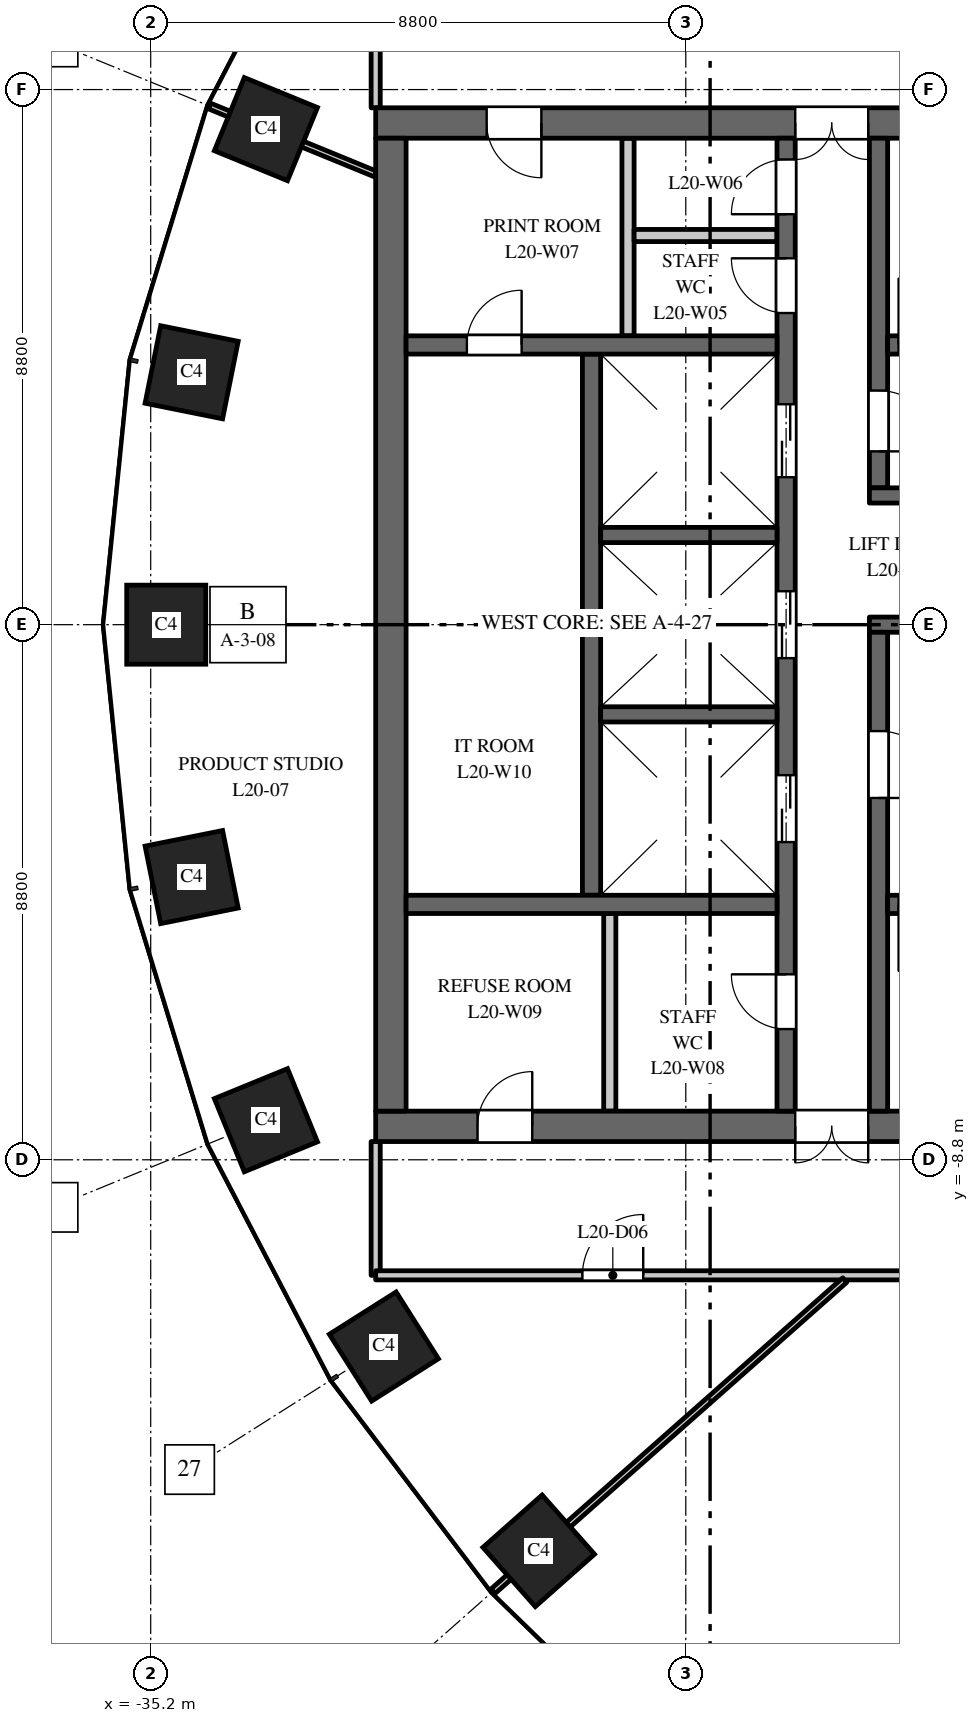
"""IFC4 building model, lengths in metres.
Left out: names, types, materials, properties, quantities, classifications, styles, units other than length and angle.
Written with IfcOpenShell. Run it as: python <this file> out.ifc"""

import sys

from ifc_helpers import new_model, si_unit, direction, frame, frame_2d, origin, origin_2d, place, context, subcontext, project, spatial, rectangle, extrude, element, fill, save


model = new_model("IFC4")
c1 = context("Model", 3, precision=1e-05, world=origin(), true_north=direction((0.0, 1.0)))
c2 = subcontext(c1, "Body", "Model", "MODEL_VIEW")
j1 = project(units=[si_unit("LENGTHUNIT", "METRE"), si_unit("PLANEANGLEUNIT", "RADIAN")], contexts=[c1])
p1 = place(None, origin())
s1 = spatial("IfcSite", under=j1, at=p1, CompositionType="ELEMENT")
p2 = place(p1, origin())
s2 = spatial("IfcBuilding", under=s1, at=p2, CompositionType="ELEMENT")
p3 = place(p2, frame((0.0, 0.0, 92.0)))
s3 = spatial("IfcBuildingStorey", under=s2, at=p3, CompositionType="ELEMENT", Elevation=92.0)
for number, where, z_axis, x_axis in (
    (1, (-33.305, 8.149, 0.0), (0.0, 0.0, 1.0), (-0.379, -0.925, 0.0)),
    (2, (-34.527, 4.151, 0.0), (0.0, 0.0, 1.0), (-0.197, -0.98, 0.0)),
    (3, (-34.945, 0.0, 0.0), (0.0, 0.0, 1.0), (0.0, -1.0, 0.0)),
    (4, (-34.527, -4.151, 0.0), (0.0, 0.0, 1.0), (0.197, -0.98, 0.0)),
    (5, (-33.305, -8.149, 0.0), (0.0, 0.0, 1.0), (0.379, -0.925, 0.0)),
    (6, (-31.365, -11.871, 0.0), (0.0, 0.0, 1.0), (0.535, -0.845, 0.0)),
    (7, (-28.819, -15.23, 0.0), (0.0, 0.0, 1.0), (0.663, -0.749, 0.0)),
):
    element("IfcColumn", number, at=place(p3, frame(where, z_axis=z_axis, x_axis=x_axis)), inside=s3, PredefinedType="COLUMN", context=c2, shape_type="SweptSolid", body=[
        extrude(rectangle(XDim=1.3, YDim=1.3, at=origin_2d()), origin(), (0.0, 0.0, 1.0), 4.0),
    ])
p4 = place(p3, frame((-16.5, 8.25, 0.0), z_axis=(0.0, 0.0, 1.0), x_axis=(-1.0, 0.0, 0.0)))
e8 = element("IfcWall", 8, at=p4, inside=s3, PredefinedType="SHEAR", context=c2, shape_type="SweptSolid", body=[
    extrude(rectangle(XDim=15.0, YDim=0.5, at=frame_2d((7.5, 0.0))), origin(), (0.0, 0.0, 1.0), 3.7),
])
p5 = place(p4, frame((6.9, 0.0, 0.0)))
e9 = element("IfcOpeningElement", 9, at=p5, cuts=e8, PredefinedType="OPENING", context=c2, shape_type="SweptSolid", body=[
    extrude(rectangle(XDim=1.2, YDim=2.1, at=frame_2d((0.6, 1.05))), frame((0.0, 0.26, 0.0), z_axis=(0.0, -1.0, 0.0), x_axis=(1.0, 0.0, 0.0)), (0.0, 0.0, 1.0), 0.52),
])
p6 = place(p4, frame((12.275, 0.0, 0.0)))
e10 = element("IfcOpeningElement", 10, at=p6, cuts=e8, PredefinedType="OPENING", context=c2, shape_type="SweptSolid", body=[
    extrude(rectangle(XDim=0.9, YDim=2.1, at=frame_2d((0.45, 1.05))), frame((0.0, 0.26, 0.0), z_axis=(0.0, -1.0, 0.0), x_axis=(1.0, 0.0, 0.0)), (0.0, 0.0, 1.0), 0.52),
])
p7 = place(p3, frame((-16.5, -8.25, 0.0), z_axis=(0.0, 0.0, 1.0), x_axis=(-1.0, 0.0, 0.0)))
e11 = element("IfcWall", 11, at=p7, inside=s3, PredefinedType="SHEAR", context=c2, shape_type="SweptSolid", body=[
    extrude(rectangle(XDim=15.0, YDim=0.5, at=frame_2d((7.5, 0.0))), origin(), (0.0, 0.0, 1.0), 3.7),
])
p8 = place(p7, frame((6.9, 0.0, 0.0)))
e12 = element("IfcOpeningElement", 12, at=p8, cuts=e11, PredefinedType="OPENING", context=c2, shape_type="SweptSolid", body=[
    extrude(rectangle(XDim=1.2, YDim=2.1, at=frame_2d((0.6, 1.05))), frame((0.0, 0.26, 0.0), z_axis=(0.0, -1.0, 0.0), x_axis=(1.0, 0.0, 0.0)), (0.0, 0.0, 1.0), 0.52),
])
p9 = place(p7, frame((12.425, 0.0, 0.0)))
e13 = element("IfcOpeningElement", 13, at=p9, cuts=e11, PredefinedType="OPENING", context=c2, shape_type="SweptSolid", body=[
    extrude(rectangle(XDim=0.9, YDim=2.1, at=frame_2d((0.45, 1.05))), frame((0.0, 0.26, 0.0), z_axis=(0.0, -1.0, 0.0), x_axis=(1.0, 0.0, 0.0)), (0.0, 0.0, 1.0), 0.52),
])
p10 = place(p3, frame((-27.95, -4.45, 0.0), z_axis=(0.0, 0.0, 1.0), x_axis=(0.0, 1.0, 0.0)))
e14 = element("IfcWall", 14, at=p10, inside=s3, PredefinedType="SHEAR", context=c2, shape_type="SweptSolid", body=[
    extrude(rectangle(XDim=8.9, YDim=0.3, at=frame_2d((4.45, 0.0))), origin(), (0.0, 0.0, 1.0), 3.7),
])
p11 = place(p3, frame((-24.75, -8.0, 0.0), z_axis=(0.0, 0.0, 1.0), x_axis=(0.0, 1.0, 0.0)))
e15 = element("IfcWall", 15, at=p11, inside=s3, PredefinedType="SHEAR", context=c2, shape_type="SweptSolid", body=[
    extrude(rectangle(XDim=16.0, YDim=0.3, at=frame_2d((8.0, 0.0))), origin(), (0.0, 0.0, 1.0), 3.7),
])
p12 = place(p11, frame((4.425, 0.0, 0.0)))
e16 = element("IfcOpeningElement", 16, at=p12, cuts=e15, PredefinedType="OPENING", context=c2, shape_type="SweptSolid", body=[
    extrude(rectangle(XDim=1.1, YDim=2.1, at=frame_2d((0.55, 1.05))), frame((0.0, 0.16, 0.0), z_axis=(0.0, -1.0, 0.0), x_axis=(1.0, 0.0, 0.0)), (0.0, 0.0, 1.0), 0.32),
])
p13 = place(p11, frame((7.45, 0.0, 0.0)))
e17 = element("IfcOpeningElement", 17, at=p13, cuts=e15, PredefinedType="OPENING", context=c2, shape_type="SweptSolid", body=[
    extrude(rectangle(XDim=1.1, YDim=2.1, at=frame_2d((0.55, 1.05))), frame((0.0, 0.16, 0.0), z_axis=(0.0, -1.0, 0.0), x_axis=(1.0, 0.0, 0.0)), (0.0, 0.0, 1.0), 0.32),
])
p14 = place(p11, frame((10.425, 0.0, 0.0)))
e18 = element("IfcOpeningElement", 18, at=p14, cuts=e15, PredefinedType="OPENING", context=c2, shape_type="SweptSolid", body=[
    extrude(rectangle(XDim=1.2, YDim=2.1, at=frame_2d((0.6, 1.05))), frame((0.0, 0.16, 0.0), z_axis=(0.0, -1.0, 0.0), x_axis=(1.0, 0.0, 0.0)), (0.0, 0.0, 1.0), 0.32),
])
p15 = place(p11, frame((13.125, 0.0, 0.0)))
e19 = element("IfcOpeningElement", 19, at=p15, cuts=e15, PredefinedType="OPENING", context=c2, shape_type="SweptSolid", body=[
    extrude(rectangle(XDim=0.9, YDim=2.1, at=frame_2d((0.45, 1.05))), frame((0.0, 0.16, 0.0), z_axis=(0.0, -1.0, 0.0), x_axis=(1.0, 0.0, 0.0)), (0.0, 0.0, 1.0), 0.32),
])
p16 = place(p11, frame((14.75, 0.0, 0.0)))
e20 = element("IfcOpeningElement", 20, at=p16, cuts=e15, PredefinedType="OPENING", context=c2, shape_type="SweptSolid", body=[
    extrude(rectangle(XDim=0.9, YDim=2.1, at=frame_2d((0.45, 1.05))), frame((0.0, 0.16, 0.0), z_axis=(0.0, -1.0, 0.0), x_axis=(1.0, 0.0, 0.0)), (0.0, 0.0, 1.0), 0.32),
])
p17 = place(p11, frame((1.35, 0.0, 0.0)))
e21 = element("IfcOpeningElement", 21, at=p17, cuts=e15, PredefinedType="OPENING", context=c2, shape_type="SweptSolid", body=[
    extrude(rectangle(XDim=0.9, YDim=2.1, at=frame_2d((0.45, 1.05))), frame((0.0, 0.16, 0.0), z_axis=(0.0, -1.0, 0.0), x_axis=(1.0, 0.0, 0.0)), (0.0, 0.0, 1.0), 0.32),
])
p18 = place(p3, frame((-20.1, 0.0, 0.0), z_axis=(0.0, 0.0, 1.0), x_axis=(-1.0, 0.0, 0.0)))
e22 = element("IfcWall", 22, at=p18, inside=s3, PredefinedType="SHEAR", context=c2, shape_type="SweptSolid", body=[
    extrude(rectangle(XDim=3.28, YDim=0.25, at=frame_2d((1.64, 0.0))), origin(), (0.0, 0.0, 1.0), 3.7),
])
p19 = place(p3, frame((-31.25, -8.0, 0.0), z_axis=(0.0, 0.0, 1.0), x_axis=(0.0, 1.0, 0.0)))
e23 = element("IfcWall", 23, at=p19, inside=s3, PredefinedType="SHEAR", context=c2, shape_type="SweptSolid", body=[
    extrude(rectangle(XDim=16.0, YDim=0.5, at=frame_2d((8.0, 0.0))), origin(), (0.0, 0.0, 1.0), 3.7),
])
p20 = place(p3, frame((-24.9, 4.6, 0.0), z_axis=(0.0, 0.0, 1.0), x_axis=(-1.0, 0.0, 0.0)))
e24 = element("IfcWall", 24, at=p20, inside=s3, PredefinedType="SHEAR", context=c2, shape_type="SweptSolid", body=[
    extrude(rectangle(XDim=6.1, YDim=0.3, at=frame_2d((3.05, 0.0))), origin(), (0.0, 0.0, 1.0), 3.7),
])
p21 = place(p20, frame((4.2, 0.0, 0.0)))
e25 = element("IfcOpeningElement", 25, at=p21, cuts=e24, PredefinedType="OPENING", context=c2, shape_type="SweptSolid", body=[
    extrude(rectangle(XDim=0.9, YDim=2.1, at=frame_2d((0.45, 1.05))), frame((0.0, 0.16, 0.0), z_axis=(0.0, -1.0, 0.0), x_axis=(1.0, 0.0, 0.0)), (0.0, 0.0, 1.0), 0.32),
])
for number, where, z_axis, x_axis in (
    (26, (-27.35, 4.75, 0.0), (0.0, 0.0, 1.0), (0.0, 1.0, 0.0)),
    (27, (-27.65, -8.0, 0.0), (0.0, 0.0, 1.0), (0.0, 1.0, 0.0)),
):
    element("IfcWall", number, at=place(p3, frame(where, z_axis=z_axis, x_axis=x_axis)), inside=s3, PredefinedType="PARTITIONING", context=c2, shape_type="SweptSolid", body=[
        extrude(rectangle(XDim=3.25, YDim=0.2, at=frame_2d((1.625, 0.0))), origin(), (0.0, 0.0, 1.0), 3.7),
    ])
p22 = place(p3, frame((-24.9, 6.4, 0.0), z_axis=(0.0, 0.0, 1.0), x_axis=(-1.0, 0.0, 0.0)))
e28 = element("IfcWall", 28, at=p22, inside=s3, PredefinedType="PARTITIONING", context=c2, shape_type="SweptSolid", body=[
    extrude(rectangle(XDim=2.35, YDim=0.2, at=frame_2d((1.175, 0.0))), origin(), (0.0, 0.0, 1.0), 3.7),
])
p23 = place(p3, frame((-24.9, -4.6, 0.0), z_axis=(0.0, 0.0, 1.0), x_axis=(-1.0, 0.0, 0.0)))
e29 = element("IfcWall", 29, at=p23, inside=s3, PredefinedType="SHEAR", context=c2, shape_type="SweptSolid", body=[
    extrude(rectangle(XDim=6.1, YDim=0.3, at=frame_2d((3.05, 0.0))), origin(), (0.0, 0.0, 1.0), 3.7),
])
for number, where, z_axis, x_axis in (
    (30, (-24.9, -1.475, 0.0), (0.0, 0.0, 1.0), (-1.0, 0.0, 0.0)),
    (31, (-24.9, 1.475, 0.0), (0.0, 0.0, 1.0), (-1.0, 0.0, 0.0)),
):
    element("IfcWall", number, at=place(p3, frame(where, z_axis=z_axis, x_axis=x_axis)), inside=s3, PredefinedType="SHEAR", context=c2, shape_type="SweptSolid", body=[
        extrude(rectangle(XDim=2.9, YDim=0.25, at=frame_2d((1.45, 0.0))), origin(), (0.0, 0.0, 1.0), 3.7),
    ])
p24 = place(p3, frame((-23.23, 2.25, 0.0), z_axis=(0.0, 0.0, 1.0), x_axis=(0.0, 1.0, 0.0)))
e32 = element("IfcWall", 32, at=p24, inside=s3, PredefinedType="SHEAR", context=c2, shape_type="SweptSolid", body=[
    extrude(rectangle(XDim=5.75, YDim=0.3, at=frame_2d((2.875, 0.0))), origin(), (0.0, 0.0, 1.0), 3.7),
])
p25 = place(p24, frame((0.6, 0.0, 0.0)))
e33 = element("IfcOpeningElement", 33, at=p25, cuts=e32, PredefinedType="OPENING", context=c2, shape_type="SweptSolid", body=[
    extrude(rectangle(XDim=1.0, YDim=2.1, at=frame_2d((0.5, 1.05))), frame((0.0, 0.16, 0.0), z_axis=(0.0, -1.0, 0.0), x_axis=(1.0, 0.0, 0.0)), (0.0, 0.0, 1.0), 0.32),
])
p26 = place(p3, frame((-23.23, -8.0, 0.0), z_axis=(0.0, 0.0, 1.0), x_axis=(0.0, 1.0, 0.0)))
e34 = element("IfcWall", 34, at=p26, inside=s3, PredefinedType="SHEAR", context=c2, shape_type="SweptSolid", body=[
    extrude(rectangle(XDim=7.875, YDim=0.3, at=frame_2d((3.938, 0.0))), origin(), (0.0, 0.0, 1.0), 3.7),
])
p27 = place(p26, frame((5.15, 0.0, 0.0)))
e35 = element("IfcOpeningElement", 35, at=p27, cuts=e34, PredefinedType="OPENING", context=c2, shape_type="SweptSolid", body=[
    extrude(rectangle(XDim=1.1, YDim=2.1, at=frame_2d((0.55, 1.05))), frame((0.0, 0.16, 0.0), z_axis=(0.0, -1.0, 0.0), x_axis=(1.0, 0.0, 0.0)), (0.0, 0.0, 1.0), 0.32),
])
p28 = place(p3, frame((-16.9, 4.6, 0.0), z_axis=(0.0, 0.0, 1.0), x_axis=(-1.0, 0.0, 0.0)))
e36 = element("IfcWall", 36, at=p28, inside=s3, PredefinedType="SHEAR", context=c2, shape_type="SweptSolid", body=[
    extrude(rectangle(XDim=6.18, YDim=0.3, at=frame_2d((3.09, 0.0))), origin(), (0.0, 0.0, 1.0), 3.7),
])
p29 = place(p28, frame((4.9, 0.0, 0.0)))
e37 = element("IfcOpeningElement", 37, at=p29, cuts=e36, PredefinedType="OPENING", context=c2, shape_type="SweptSolid", body=[
    extrude(rectangle(XDim=1.1, YDim=2.1, at=frame_2d((0.55, 1.05))), frame((0.0, 0.16, 0.0), z_axis=(0.0, -1.0, 0.0), x_axis=(1.0, 0.0, 0.0)), (0.0, 0.0, 1.0), 0.32),
])
p30 = place(p3, frame((-16.9, -4.6, 0.0), z_axis=(0.0, 0.0, 1.0), x_axis=(-1.0, 0.0, 0.0)))
e38 = element("IfcWall", 38, at=p30, inside=s3, PredefinedType="SHEAR", context=c2, shape_type="SweptSolid", body=[
    extrude(rectangle(XDim=6.18, YDim=0.3, at=frame_2d((3.09, 0.0))), origin(), (0.0, 0.0, 1.0), 3.7),
])
p31 = place(p30, frame((4.9, 0.0, 0.0)))
e39 = element("IfcOpeningElement", 39, at=p31, cuts=e38, PredefinedType="OPENING", context=c2, shape_type="SweptSolid", body=[
    extrude(rectangle(XDim=1.1, YDim=2.1, at=frame_2d((0.55, 1.05))), frame((0.0, 0.16, 0.0), z_axis=(0.0, -1.0, 0.0), x_axis=(1.0, 0.0, 0.0)), (0.0, 0.0, 1.0), 0.32),
])
p32 = place(p3, frame((-20.85, 2.125, 0.0), z_axis=(0.0, 0.0, 1.0), x_axis=(-1.0, 0.0, 0.0)))
e40 = element("IfcWall", 40, at=p32, inside=s3, PredefinedType="SHEAR", context=c2, shape_type="SweptSolid", body=[
    extrude(rectangle(XDim=2.53, YDim=0.25, at=frame_2d((1.265, 0.0))), origin(), (0.0, 0.0, 1.0), 3.7),
])
p33 = place(p3, frame((-34.234, 8.53, 0.0), z_axis=(0.0, 0.0, 1.0), x_axis=(0.925344112436, -0.379128307542, 0.0)))
e41 = element("IfcWall", 41, at=p33, inside=s3, PredefinedType="PARTITIONING", context=c2, shape_type="SweptSolid", body=[
    extrude(rectangle(XDim=2.954, YDim=0.1, at=frame_2d((1.477, 0.0))), origin(), (0.0, 0.0, 1.0), 2.9),
])
p34 = place(p3, frame((-31.5, -10.7, 0.0), z_axis=(0.0, 0.0, 1.0), x_axis=(0.0, 1.0, 0.0)))
e42 = element("IfcWall", 42, at=p34, inside=s3, PredefinedType="PARTITIONING", context=c2, shape_type="SweptSolid", body=[
    extrude(rectangle(XDim=2.2, YDim=0.15, at=frame_2d((1.1, 0.0))), origin(), (0.0, 0.0, 1.0), 3.7),
])
p35 = place(p3, frame((-31.5, -10.7, 0.0), z_axis=(0.0, 0.0, 1.0), x_axis=(1.0, 0.0, 0.0)))
e43 = element("IfcWall", 43, at=p35, inside=s3, PredefinedType="PARTITIONING", context=c2, shape_type="SweptSolid", body=[
    extrude(rectangle(XDim=15.0, YDim=0.15, at=frame_2d((7.5, 0.0))), origin(), (0.0, 0.0, 1.0), 3.1),
])
p36 = place(p35, frame((3.4, 0.0, 0.0)))
e44 = element("IfcOpeningElement", 44, at=p36, cuts=e43, PredefinedType="OPENING", context=c2, shape_type="SweptSolid", body=[
    extrude(rectangle(XDim=1.0, YDim=2.1, at=frame_2d((0.5, 1.05))), frame((0.0, 0.085, 0.0), z_axis=(0.0, -1.0, 0.0), x_axis=(1.0, 0.0, 0.0)), (0.0, 0.0, 1.0), 0.17),
])
p37 = place(p35, frame((10.948, 0.0, 0.0)))
e45 = element("IfcOpeningElement", 45, at=p37, cuts=e43, PredefinedType="OPENING", context=c2, shape_type="SweptSolid", body=[
    extrude(rectangle(XDim=1.0, YDim=2.1, at=frame_2d((0.5, 1.05))), frame((0.0, 0.085, 0.0), z_axis=(0.0, -1.0, 0.0), x_axis=(1.0, 0.0, 0.0)), (0.0, 0.0, 1.0), 0.17),
])
p38 = place(p3, frame((-31.5, 8.5, 0.0), z_axis=(0.0, 0.0, 1.0), x_axis=(0.0, 1.0, 0.0)))
e46 = element("IfcWall", 46, at=p38, inside=s3, PredefinedType="PARTITIONING", context=c2, shape_type="SweptSolid", body=[
    extrude(rectangle(XDim=2.2, YDim=0.15, at=frame_2d((1.1, 0.0))), origin(), (0.0, 0.0, 1.0), 3.7),
])
p39 = place(p3, frame((-29.569, -15.895, 0.0), z_axis=(0.0, 0.0, 1.0), x_axis=(0.748985701008, 0.662586160198, 0.0)))
e47 = element("IfcWall", 47, at=p39, inside=s3, PredefinedType="PARTITIONING", context=c2, shape_type="SweptSolid", body=[
    extrude(rectangle(XDim=7.723, YDim=0.1, at=frame_2d((3.861, 0.0))), origin(), (0.0, 0.0, 1.0), 2.9),
])
p40 = place(p12, origin())
e48 = element("IfcDoor", 48, at=p40, inside=s3, OperationType="DOUBLE_DOOR_SLIDING", PredefinedType="DOOR", context=c2, shape_type="SweptSolid", body=[
    extrude(rectangle(XDim=1.1, YDim=2.1, at=frame_2d((0.55, 1.05))), frame((0.0, 0.025, 0.0), z_axis=(0.0, -1.0, 0.0), x_axis=(1.0, 0.0, 0.0)), (0.0, 0.0, 1.0), 0.05),
])
fill(e16, e48)
p41 = place(p13, origin())
e49 = element("IfcDoor", 49, at=p41, inside=s3, OperationType="DOUBLE_DOOR_SLIDING", PredefinedType="DOOR", context=c2, shape_type="SweptSolid", body=[
    extrude(rectangle(XDim=1.1, YDim=2.1, at=frame_2d((0.55, 1.05))), frame((0.0, 0.025, 0.0), z_axis=(0.0, -1.0, 0.0), x_axis=(1.0, 0.0, 0.0)), (0.0, 0.0, 1.0), 0.05),
])
fill(e17, e49)
p42 = place(p14, origin())
e50 = element("IfcDoor", 50, at=p42, inside=s3, OperationType="DOUBLE_DOOR_SLIDING", PredefinedType="DOOR", context=c2, shape_type="SweptSolid", body=[
    extrude(rectangle(XDim=1.2, YDim=2.1, at=frame_2d((0.6, 1.05))), frame((0.0, 0.025, 0.0), z_axis=(0.0, -1.0, 0.0), x_axis=(1.0, 0.0, 0.0)), (0.0, 0.0, 1.0), 0.05),
])
fill(e18, e50)
p43 = place(p29, origin())
e51 = element("IfcDoor", 51, at=p43, inside=s3, OperationType="SINGLE_SWING_RIGHT", PredefinedType="DOOR", context=c2, shape_type="SweptSolid", body=[
    extrude(rectangle(XDim=1.1, YDim=2.1, at=frame_2d((0.55, 1.05))), frame((0.0, 0.025, 0.0), z_axis=(0.0, -1.0, 0.0), x_axis=(1.0, 0.0, 0.0)), (0.0, 0.0, 1.0), 0.05),
])
fill(e37, e51)
p44 = place(p31, origin())
e52 = element("IfcDoor", 52, at=p44, inside=s3, OperationType="SINGLE_SWING_LEFT", PredefinedType="DOOR", context=c2, shape_type="SweptSolid", body=[
    extrude(rectangle(XDim=1.1, YDim=2.1, at=frame_2d((0.55, 1.05))), frame((0.0, 0.025, 0.0), z_axis=(0.0, -1.0, 0.0), x_axis=(1.0, 0.0, 0.0)), (0.0, 0.0, 1.0), 0.05),
])
fill(e39, e52)
p45 = place(p27, origin())
e53 = element("IfcDoor", 53, at=p45, inside=s3, OperationType="SINGLE_SWING_LEFT", PredefinedType="DOOR", context=c2, shape_type="SweptSolid", body=[
    extrude(rectangle(XDim=1.1, YDim=2.1, at=frame_2d((0.55, 1.05))), frame((0.0, 0.025, 0.0), z_axis=(0.0, -1.0, 0.0), x_axis=(1.0, 0.0, 0.0)), (0.0, 0.0, 1.0), 0.05),
])
fill(e35, e53)
p46 = place(p25, origin())
e54 = element("IfcDoor", 54, at=p46, inside=s3, OperationType="SINGLE_SWING_LEFT", PredefinedType="DOOR", context=c2, shape_type="SweptSolid", body=[
    extrude(rectangle(XDim=1.0, YDim=2.1, at=frame_2d((0.5, 1.05))), frame((0.0, 0.025, 0.0), z_axis=(0.0, -1.0, 0.0), x_axis=(1.0, 0.0, 0.0)), (0.0, 0.0, 1.0), 0.05),
])
fill(e33, e54)
p47 = place(p5, origin())
e55 = element("IfcDoor", 55, at=p47, inside=s3, OperationType="DOUBLE_DOOR_DOUBLE_SWING", PredefinedType="DOOR", context=c2, shape_type="SweptSolid", body=[
    extrude(rectangle(XDim=1.2, YDim=2.1, at=frame_2d((0.6, 1.05))), frame((0.0, 0.025, 0.0), z_axis=(0.0, -1.0, 0.0), x_axis=(1.0, 0.0, 0.0)), (0.0, 0.0, 1.0), 0.05),
])
fill(e9, e55)
p48 = place(p8, origin())
e56 = element("IfcDoor", 56, at=p48, inside=s3, OperationType="DOUBLE_DOOR_DOUBLE_SWING", PredefinedType="DOOR", context=c2, shape_type="SweptSolid", body=[
    extrude(rectangle(XDim=1.2, YDim=2.1, at=frame_2d((0.6, 1.05))), frame((0.0, 0.025, 0.0), z_axis=(0.0, -1.0, 0.0), x_axis=(1.0, 0.0, 0.0)), (0.0, 0.0, 1.0), 0.05),
])
fill(e12, e56)
p49 = place(p15, origin())
e57 = element("IfcDoor", 57, at=p49, inside=s3, OperationType="SINGLE_SWING_LEFT", PredefinedType="DOOR", context=c2, shape_type="SweptSolid", body=[
    extrude(rectangle(XDim=0.9, YDim=2.1, at=frame_2d((0.45, 1.05))), frame((0.0, 0.025, 0.0), z_axis=(0.0, -1.0, 0.0), x_axis=(1.0, 0.0, 0.0)), (0.0, 0.0, 1.0), 0.05),
])
fill(e19, e57)
p50 = place(p16, origin())
e58 = element("IfcDoor", 58, at=p50, inside=s3, OperationType="SINGLE_SWING_RIGHT", PredefinedType="DOOR", context=c2, shape_type="SweptSolid", body=[
    extrude(rectangle(XDim=0.9, YDim=2.1, at=frame_2d((0.45, 1.05))), frame((0.0, 0.025, 0.0), z_axis=(0.0, -1.0, 0.0), x_axis=(1.0, 0.0, 0.0)), (0.0, 0.0, 1.0), 0.05),
])
fill(e20, e58)
p51 = place(p6, origin())
e59 = element("IfcDoor", 59, at=p51, inside=s3, OperationType="SINGLE_SWING_RIGHT", PredefinedType="DOOR", context=c2, shape_type="SweptSolid", body=[
    extrude(rectangle(XDim=0.9, YDim=2.1, at=frame_2d((0.45, 1.05))), frame((0.0, 0.025, 0.0), z_axis=(0.0, -1.0, 0.0), x_axis=(1.0, 0.0, 0.0)), (0.0, 0.0, 1.0), 0.05),
])
fill(e10, e59)
p52 = place(p17, origin())
e60 = element("IfcDoor", 60, at=p52, inside=s3, OperationType="SINGLE_SWING_LEFT", PredefinedType="DOOR", context=c2, shape_type="SweptSolid", body=[
    extrude(rectangle(XDim=0.9, YDim=2.1, at=frame_2d((0.45, 1.05))), frame((0.0, 0.025, 0.0), z_axis=(0.0, -1.0, 0.0), x_axis=(1.0, 0.0, 0.0)), (0.0, 0.0, 1.0), 0.05),
])
fill(e21, e60)
p53 = place(p9, origin())
e61 = element("IfcDoor", 61, at=p53, inside=s3, OperationType="SINGLE_SWING_LEFT", PredefinedType="DOOR", context=c2, shape_type="SweptSolid", body=[
    extrude(rectangle(XDim=0.9, YDim=2.1, at=frame_2d((0.45, 1.05))), frame((0.0, 0.025, 0.0), z_axis=(0.0, -1.0, 0.0), x_axis=(1.0, 0.0, 0.0)), (0.0, 0.0, 1.0), 0.05),
])
fill(e13, e61)
p54 = place(p21, origin())
e62 = element("IfcDoor", 62, at=p54, inside=s3, OperationType="SINGLE_SWING_LEFT", PredefinedType="DOOR", context=c2, shape_type="SweptSolid", body=[
    extrude(rectangle(XDim=0.9, YDim=2.1, at=frame_2d((0.45, 1.05))), frame((0.0, 0.025, 0.0), z_axis=(0.0, -1.0, 0.0), x_axis=(1.0, 0.0, 0.0)), (0.0, 0.0, 1.0), 0.05),
])
fill(e25, e62)
p55 = place(p36, origin())
e63 = element("IfcDoor", 63, at=p55, inside=s3, OperationType="SINGLE_SWING_RIGHT", PredefinedType="DOOR", context=c2, shape_type="SweptSolid", body=[
    extrude(rectangle(XDim=1.0, YDim=2.1, at=frame_2d((0.5, 1.05))), frame((0.0, 0.025, 0.0), z_axis=(0.0, -1.0, 0.0), x_axis=(1.0, 0.0, 0.0)), (0.0, 0.0, 1.0), 0.05),
])
fill(e44, e63)
save(model, sys.argv[1])
